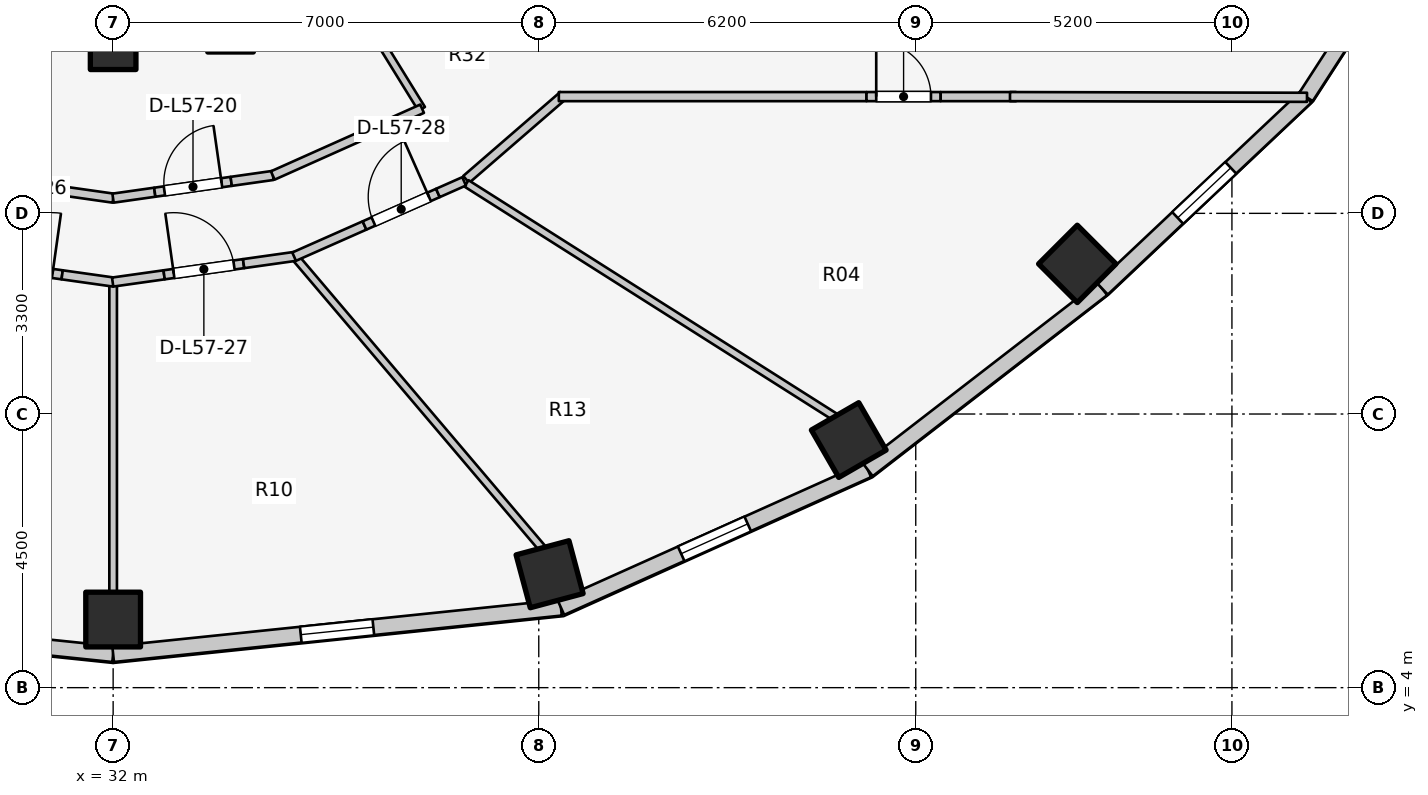
"""IFC4 building model, lengths in metres.
Left out: names, types, materials, properties, quantities, classifications, styles, units other than length and angle.
Written with IfcOpenShell. Run it as: python <this file> out.ifc"""

import sys

from ifc_helpers import new_model, si_unit, direction, frame, frame_2d, origin, origin_2d, place, context, subcontext, project, spatial, rectangle, extrude, element, fill, save


model = new_model("IFC4")
c1 = context("Model", 3, precision=1e-05, world=origin(), true_north=direction((0.0, 1.0)))
c2 = subcontext(c1, "Body", "Model", "MODEL_VIEW")
j1 = project(units=[si_unit("LENGTHUNIT", "METRE"), si_unit("PLANEANGLEUNIT", "RADIAN")], contexts=[c1])
p1 = place(None, origin())
s1 = spatial("IfcSite", under=j1, at=p1, CompositionType="ELEMENT")
p2 = place(p1, origin())
s2 = spatial("IfcBuilding", under=s1, at=p2, CompositionType="ELEMENT")
p3 = place(p2, frame((0.0, 0.0, 187.0)))
s3 = spatial("IfcBuildingStorey", under=s2, at=p3, CompositionType="ELEMENT", Elevation=187.0)
p4 = place(p3, frame((32.0, 14.54, 0.0), z_axis=(0.0, 0.0, 1.0), x_axis=(1.0, 0.0, 0.0)))
e1 = element("IfcColumn", 1, at=p4, inside=s3, PredefinedType="COLUMN", context=c2, shape_type="SweptSolid", body=[
    extrude(rectangle(XDim=0.75, YDim=0.75, at=origin_2d()), origin(), (0.0, 0.0, 1.0), 3.1),
])
for number, where, z_axis, x_axis in (
    (2, (32.0, 5.12, 0.0), (0.0, 0.0, 1.0), (0.0, -1.0, 0.0)),
    (3, (39.178, 5.865, 0.0), (0.0, 0.0, 1.0), (0.259, -0.966, 0.0)),
    (4, (44.098, 8.072, 0.0), (0.0, 0.0, 1.0), (0.5, -0.866, 0.0)),
    (5, (47.857, 10.969, 0.0), (0.0, 0.0, 1.0), (0.707, -0.707, 0.0)),
):
    element("IfcColumn", number, at=place(p3, frame(where, z_axis=z_axis, x_axis=x_axis)), inside=s3, PredefinedType="COLUMN", context=c2, shape_type="SweptSolid", body=[
        extrude(rectangle(XDim=0.9, YDim=0.9, at=origin_2d()), origin(), (0.0, 0.0, 1.0), 3.1),
    ])
p5 = place(p3, frame((24.635, 5.315, 0.0), z_axis=(0.0, 0.0, 1.0), x_axis=(0.994664178965, -0.10316574569, 0.0)))
e6 = element("IfcWall", 6, at=p5, inside=s3, PredefinedType="STANDARD", context=c2, shape_type="SweptSolid", body=[
    extrude(rectangle(XDim=7.405, YDim=0.26, at=frame_2d((3.702, 0.0))), origin(), (0.0, 0.0, 1.0), 1.22),
])
p6 = place(p5, frame((3.102, 0.0, 0.15)))
e7 = element("IfcOpeningElement", 7, at=p6, cuts=e6, PredefinedType="OPENING", context=c2, shape_type="SweptSolid", body=[
    extrude(rectangle(XDim=1.2, YDim=0.9, at=frame_2d((0.6, 0.45))), frame((0.0, 0.14, 0.0), z_axis=(0.0, -1.0, 0.0), x_axis=(1.0, 0.0, 0.0)), (0.0, 0.0, 1.0), 0.28),
])
p7 = place(p3, frame((32.0, 4.552, 0.0), z_axis=(0.0, 0.0, 1.0), x_axis=(0.994664178965, 0.10316574569, 0.0)))
e8 = element("IfcWall", 8, at=p7, inside=s3, PredefinedType="STANDARD", context=c2, shape_type="SweptSolid", body=[
    extrude(rectangle(XDim=7.405, YDim=0.26, at=frame_2d((3.702, 0.0))), origin(), (0.0, 0.0, 1.0), 1.22),
])
p8 = place(p7, frame((3.102, 0.0, 0.15)))
e9 = element("IfcOpeningElement", 9, at=p8, cuts=e8, PredefinedType="OPENING", context=c2, shape_type="SweptSolid", body=[
    extrude(rectangle(XDim=1.2, YDim=0.9, at=frame_2d((0.6, 0.45))), frame((0.0, 0.14, 0.0), z_axis=(0.0, -1.0, 0.0), x_axis=(1.0, 0.0, 0.0)), (0.0, 0.0, 1.0), 0.28),
])
p9 = place(p3, frame((39.365, 5.315, 0.0), z_axis=(0.0, 0.0, 1.0), x_axis=(0.912353637112, 0.409403029847, 0.0)))
e10 = element("IfcWall", 10, at=p9, inside=s3, PredefinedType="STANDARD", context=c2, shape_type="SweptSolid", body=[
    extrude(rectangle(XDim=5.533, YDim=0.26, at=frame_2d((2.766, 0.0))), origin(), (0.0, 0.0, 1.0), 1.22),
])
p10 = place(p9, frame((2.167, 0.0, 0.15)))
e11 = element("IfcOpeningElement", 11, at=p10, cuts=e10, PredefinedType="OPENING", context=c2, shape_type="SweptSolid", body=[
    extrude(rectangle(XDim=1.2, YDim=0.9, at=frame_2d((0.6, 0.45))), frame((0.0, 0.14, 0.0), z_axis=(0.0, -1.0, 0.0), x_axis=(1.0, 0.0, 0.0)), (0.0, 0.0, 1.0), 0.28),
])
p11 = place(p3, frame((44.413, 7.581, 0.0), z_axis=(0.0, 0.0, 1.0), x_axis=(0.791460185804, 0.611220724687, 0.0)))
e12 = element("IfcWall", 12, at=p11, inside=s3, PredefinedType="STANDARD", context=c2, shape_type="SweptSolid", body=[
    extrude(rectangle(XDim=4.872, YDim=0.26, at=frame_2d((2.436, 0.0))), origin(), (0.0, 0.0, 1.0), 1.22),
])
p12 = place(p3, frame((48.269, 10.559, 0.0), z_axis=(0.0, 0.0, 1.0), x_axis=(0.727667301037, 0.68593024354, 0.0)))
e13 = element("IfcWall", 13, at=p12, inside=s3, PredefinedType="STANDARD", context=c2, shape_type="SweptSolid", body=[
    extrude(rectangle(XDim=4.604, YDim=0.26, at=frame_2d((2.302, 0.0))), origin(), (0.0, 0.0, 1.0), 1.22),
])
p13 = place(p12, frame((1.702, 0.0, 0.15)))
e14 = element("IfcOpeningElement", 14, at=p13, cuts=e13, PredefinedType="OPENING", context=c2, shape_type="SweptSolid", body=[
    extrude(rectangle(XDim=1.2, YDim=0.9, at=frame_2d((0.6, 0.45))), frame((0.0, 0.14, 0.0), z_axis=(0.0, -1.0, 0.0), x_axis=(1.0, 0.0, 0.0)), (0.0, 0.0, 1.0), 0.28),
])
p14 = place(p3, frame((51.619, 13.716, 0.0), z_axis=(0.0, 0.0, 1.0), x_axis=(0.543358984534, 0.839500454989, 0.0)))
e15 = element("IfcWall", 15, at=p14, inside=s3, PredefinedType="STANDARD", context=c2, shape_type="SweptSolid", body=[
    extrude(rectangle(XDim=4.511, YDim=0.26, at=frame_2d((2.256, 0.0))), origin(), (0.0, 0.0, 1.0), 1.22),
])
p15 = place(p14, frame((1.656, 0.0, 0.15)))
e16 = element("IfcOpeningElement", 16, at=p15, cuts=e15, PredefinedType="OPENING", context=c2, shape_type="SweptSolid", body=[
    extrude(rectangle(XDim=1.2, YDim=0.9, at=frame_2d((0.6, 0.45))), frame((0.0, 0.14, 0.0), z_axis=(0.0, -1.0, 0.0), x_axis=(1.0, 0.0, 0.0)), (0.0, 0.0, 1.0), 0.28),
])
p16 = place(p3, frame((37.807, 12.358, 0.0), z_axis=(0.0, 0.0, 1.0), x_axis=(0.756055312247, 0.654507727092, 0.0)))
e17 = element("IfcWall", 17, at=p16, inside=s3, PredefinedType="PARTITIONING", context=c2, shape_type="SweptSolid", body=[
    extrude(rectangle(XDim=2.111, YDim=0.15, at=frame_2d((1.055, 0.0))), origin(), (0.0, 0.0, 1.0), 1.22),
])
p17 = place(p3, frame((39.33, 13.72, 0.0), z_axis=(0.0, 0.0, 1.0), x_axis=(1.0, 0.0, 0.0)))
e18 = element("IfcWall", 18, at=p17, inside=s3, PredefinedType="PARTITIONING", context=c2, shape_type="SweptSolid", body=[
    extrude(rectangle(XDim=5.06, YDim=0.15, at=frame_2d((2.53, 0.0))), origin(), (0.0, 0.0, 1.0), 1.22),
])
p18 = place(p3, frame((44.39, 13.72, 0.0), z_axis=(0.0, 0.0, 1.0), x_axis=(1.0, 0.0, 0.0)))
e19 = element("IfcWall", 19, at=p18, inside=s3, PredefinedType="PARTITIONING", context=c2, shape_type="SweptSolid", body=[
    extrude(rectangle(XDim=1.22, YDim=0.15, at=frame_2d((0.61, 0.0))), origin(), (0.0, 0.0, 1.0), 2.575),
])
p19 = place(p18, frame((0.16, 0.0, 0.0)))
e20 = element("IfcOpeningElement", 20, at=p19, cuts=e19, PredefinedType="OPENING", context=c2, shape_type="SweptSolid", body=[
    extrude(rectangle(XDim=0.9, YDim=2.1, at=frame_2d((0.45, 1.05))), frame((0.0, 0.085, 0.0), z_axis=(0.0, -1.0, 0.0), x_axis=(1.0, 0.0, 0.0)), (0.0, 0.0, 1.0), 0.17),
])
p20 = place(p3, frame((45.61, 13.72, 0.0), z_axis=(0.0, 0.0, 1.0), x_axis=(1.0, 0.0, 0.0)))
e21 = element("IfcWall", 21, at=p20, inside=s3, PredefinedType="PARTITIONING", context=c2, shape_type="SweptSolid", body=[
    extrude(rectangle(XDim=1.24, YDim=0.15, at=frame_2d((0.62, 0.0))), origin(), (0.0, 0.0, 1.0), 2.575),
])
p21 = place(p3, frame((46.75, 13.72, 0.0), z_axis=(0.0, 0.0, 1.0), x_axis=(0.999997122315, -0.00239903348, 0.0)))
e22 = element("IfcWall", 22, at=p21, inside=s3, PredefinedType="PARTITIONING", context=c2, shape_type="SweptSolid", body=[
    extrude(rectangle(XDim=4.885, YDim=0.15, at=frame_2d((2.442, 0.0))), origin(), (0.0, 0.0, 1.0), 1.22),
])
p22 = place(p3, frame((35.55, 15.985, 0.0), z_axis=(0.0, 0.0, 1.0), x_axis=(0.525627246902, -0.850714991824, 0.0)))
e23 = element("IfcWall", 23, at=p22, inside=s3, PredefinedType="PARTITIONING", context=c2, shape_type="SweptSolid", body=[
    extrude(rectangle(XDim=2.901, YDim=0.125, at=frame_2d((1.451, 0.0))), origin(), (0.0, 0.0, 1.0), 1.22),
])
p23 = place(p3, frame((29.371, 12.424, 0.0), z_axis=(0.0, 0.0, 1.0), x_axis=(0.990066775667, -0.1405979364, 0.0)))
e24 = element("IfcWall", 24, at=p23, inside=s3, PredefinedType="PARTITIONING", context=c2, shape_type="SweptSolid", body=[
    extrude(rectangle(XDim=2.657, YDim=0.15, at=frame_2d((1.328, 0.0))), origin(), (0.0, 0.0, 1.0), 1.22),
])
p24 = place(p3, frame((31.998, 12.05, 0.0), z_axis=(0.0, 0.0, 1.0), x_axis=(0.990082845611, 0.140484728093, 0.0)))
e25 = element("IfcWall", 25, at=p24, inside=s3, PredefinedType="PARTITIONING", context=c2, shape_type="SweptSolid", body=[
    extrude(rectangle(XDim=0.693, YDim=0.15, at=frame_2d((0.347, 0.0))), origin(), (0.0, 0.0, 1.0), 1.22),
])
p25 = place(p3, frame((32.685, 12.147, 0.0), z_axis=(0.0, 0.0, 1.0), x_axis=(0.990049212475, 0.140721557967, 0.0)))
e26 = element("IfcWall", 26, at=p25, inside=s3, PredefinedType="PARTITIONING", context=c2, shape_type="SweptSolid", body=[
    extrude(rectangle(XDim=1.27, YDim=0.15, at=frame_2d((0.635, 0.0))), origin(), (0.0, 0.0, 1.0), 2.575),
])
p26 = place(p25, frame((0.16, 0.0, 0.0)))
e27 = element("IfcOpeningElement", 27, at=p26, cuts=e26, PredefinedType="OPENING", context=c2, shape_type="SweptSolid", body=[
    extrude(rectangle(XDim=0.95, YDim=2.1, at=frame_2d((0.475, 1.05))), frame((0.0, 0.085, 0.0), z_axis=(0.0, -1.0, 0.0), x_axis=(1.0, 0.0, 0.0)), (0.0, 0.0, 1.0), 0.17),
])
p27 = place(p3, frame((33.942, 12.326, 0.0), z_axis=(0.0, 0.0, 1.0), x_axis=(0.990082845611, 0.140484728093, 0.0)))
e28 = element("IfcWall", 28, at=p27, inside=s3, PredefinedType="PARTITIONING", context=c2, shape_type="SweptSolid", body=[
    extrude(rectangle(XDim=0.693, YDim=0.15, at=frame_2d((0.347, 0.0))), origin(), (0.0, 0.0, 1.0), 2.575),
])
p28 = place(p3, frame((34.625, 12.423, 0.0), z_axis=(0.0, 0.0, 1.0), x_axis=(0.912888568324, 0.408208845842, 0.0)))
e29 = element("IfcWall", 29, at=p28, inside=s3, PredefinedType="PARTITIONING", context=c2, shape_type="SweptSolid", body=[
    extrude(rectangle(XDim=2.69, YDim=0.15, at=frame_2d((1.345, 0.0))), origin(), (0.0, 0.0, 1.0), 1.22),
])
p29 = place(p3, frame((32.0, 10.615, 0.0), z_axis=(0.0, 0.0, 1.0), x_axis=(0.0, -1.0, 0.0)))
e30 = element("IfcWall", 30, at=p29, inside=s3, PredefinedType="PARTITIONING", context=c2, shape_type="SweptSolid", body=[
    extrude(rectangle(XDim=5.065, YDim=0.125, at=frame_2d((2.532, 0.0))), origin(), (0.0, 0.0, 1.0), 1.22),
])
p30 = place(p3, frame((35.02, 11.048, 0.0), z_axis=(0.0, 0.0, 1.0), x_axis=(0.647173462792, -0.762342776615, 0.0)))
e31 = element("IfcWall", 31, at=p30, inside=s3, PredefinedType="PARTITIONING", context=c2, shape_type="SweptSolid", body=[
    extrude(rectangle(XDim=6.253, YDim=0.125, at=frame_2d((3.127, 0.0))), origin(), (0.0, 0.0, 1.0), 1.22),
])
p31 = place(p3, frame((37.812, 12.292, 0.0), z_axis=(0.0, 0.0, 1.0), x_axis=(0.844640430122, -0.535334048799, 0.0)))
e32 = element("IfcWall", 32, at=p31, inside=s3, PredefinedType="PARTITIONING", context=c2, shape_type="SweptSolid", body=[
    extrude(rectangle(XDim=7.188, YDim=0.125, at=frame_2d((3.594, 0.0))), origin(), (0.0, 0.0, 1.0), 1.22),
])
p32 = place(p3, frame((29.854, 10.973, 0.0), z_axis=(0.0, 0.0, 1.0), x_axis=(0.990254187593, -0.139271834751, 0.0)))
e33 = element("IfcWall", 33, at=p32, inside=s3, PredefinedType="PARTITIONING", context=c2, shape_type="SweptSolid", body=[
    extrude(rectangle(XDim=1.32, YDim=0.15, at=frame_2d((0.66, 0.0))), origin(), (0.0, 0.0, 1.0), 2.575),
])
p33 = place(p32, frame((0.16, 0.0, 0.0)))
e34 = element("IfcOpeningElement", 34, at=p33, cuts=e33, PredefinedType="OPENING", context=c2, shape_type="SweptSolid", body=[
    extrude(rectangle(XDim=1.0, YDim=2.1, at=frame_2d((0.5, 1.05))), frame((0.0, 0.085, 0.0), z_axis=(0.0, -1.0, 0.0), x_axis=(1.0, 0.0, 0.0)), (0.0, 0.0, 1.0), 0.17),
])
for number, where, z_axis, x_axis in (
    (35, (31.162, 10.789, 0.0), (0.0, 0.0, 1.0), (0.99, -0.14, 0.0)),
    (36, (31.992, 10.67, 0.0), (0.0, 0.0, 1.0), (0.99, 0.14, 0.0)),
):
    element("IfcWall", number, at=place(p3, frame(where, z_axis=z_axis, x_axis=x_axis)), inside=s3, PredefinedType="PARTITIONING", context=c2, shape_type="SweptSolid", body=[
        extrude(rectangle(XDim=0.855, YDim=0.15, at=frame_2d((0.427, 0.0))), origin(), (0.0, 0.0, 1.0), 1.22),
    ])
p34 = place(p3, frame((32.838, 10.789, 0.0), z_axis=(0.0, 0.0, 1.0), x_axis=(0.990254187593, 0.139271834751, 0.0)))
e37 = element("IfcWall", 37, at=p34, inside=s3, PredefinedType="PARTITIONING", context=c2, shape_type="SweptSolid", body=[
    extrude(rectangle(XDim=1.32, YDim=0.15, at=frame_2d((0.66, 0.0))), origin(), (0.0, 0.0, 1.0), 2.575),
])
p35 = place(p34, frame((0.16, 0.0, 0.0)))
e38 = element("IfcOpeningElement", 38, at=p35, cuts=e37, PredefinedType="OPENING", context=c2, shape_type="SweptSolid", body=[
    extrude(rectangle(XDim=1.0, YDim=2.1, at=frame_2d((0.5, 1.05))), frame((0.0, 0.085, 0.0), z_axis=(0.0, -1.0, 0.0), x_axis=(1.0, 0.0, 0.0)), (0.0, 0.0, 1.0), 0.17),
])
p36 = place(p3, frame((34.146, 10.973, 0.0), z_axis=(0.0, 0.0, 1.0), x_axis=(0.990238723834, 0.139381741342, 0.0)))
e39 = element("IfcWall", 39, at=p36, inside=s3, PredefinedType="PARTITIONING", context=c2, shape_type="SweptSolid", body=[
    extrude(rectangle(XDim=0.855, YDim=0.15, at=frame_2d((0.427, 0.0))), origin(), (0.0, 0.0, 1.0), 2.575),
])
p37 = place(p3, frame((34.976, 11.088, 0.0), z_axis=(0.0, 0.0, 1.0), x_axis=(0.914311660367, 0.405011342701, 0.0)))
e40 = element("IfcWall", 40, at=p37, inside=s3, PredefinedType="PARTITIONING", context=c2, shape_type="SweptSolid", body=[
    extrude(rectangle(XDim=1.267, YDim=0.15, at=frame_2d((0.633, 0.0))), origin(), (0.0, 0.0, 1.0), 1.22),
])
p38 = place(p3, frame((36.134, 11.601, 0.0), z_axis=(0.0, 0.0, 1.0), x_axis=(0.914314172667, 0.405005671145, 0.0)))
e41 = element("IfcWall", 41, at=p38, inside=s3, PredefinedType="PARTITIONING", context=c2, shape_type="SweptSolid", body=[
    extrude(rectangle(XDim=1.32, YDim=0.15, at=frame_2d((0.66, 0.0))), origin(), (0.0, 0.0, 1.0), 2.16),
])
p39 = place(p38, frame((0.16, 0.0, 0.0)))
e42 = element("IfcOpeningElement", 42, at=p39, cuts=e41, PredefinedType="OPENING", context=c2, shape_type="SweptSolid", body=[
    extrude(rectangle(XDim=1.0, YDim=2.1, at=frame_2d((0.5, 1.05))), frame((0.0, 0.085, 0.0), z_axis=(0.0, -1.0, 0.0), x_axis=(1.0, 0.0, 0.0)), (0.0, 0.0, 1.0), 0.17),
])
p40 = place(p3, frame((37.341, 12.135, 0.0), z_axis=(0.0, 0.0, 1.0), x_axis=(0.914387769504, 0.404839482983, 0.0)))
e43 = element("IfcWall", 43, at=p40, inside=s3, PredefinedType="PARTITIONING", context=c2, shape_type="SweptSolid", body=[
    extrude(rectangle(XDim=0.471, YDim=0.15, at=frame_2d((0.235, 0.0))), origin(), (0.0, 0.0, 1.0), 2.575),
])
p41 = place(p8, origin())
e44 = element("IfcWindow", 44, at=p41, inside=s3, PartitioningType="SINGLE_PANEL", PredefinedType="WINDOW", context=c2, shape_type="SweptSolid", body=[
    extrude(rectangle(XDim=1.2, YDim=0.9, at=frame_2d((0.6, 0.45))), frame((0.0, 0.03, 0.0), z_axis=(0.0, -1.0, 0.0), x_axis=(1.0, 0.0, 0.0)), (0.0, 0.0, 1.0), 0.06),
])
fill(e9, e44)
p42 = place(p10, origin())
e45 = element("IfcWindow", 45, at=p42, inside=s3, PartitioningType="SINGLE_PANEL", PredefinedType="WINDOW", context=c2, shape_type="SweptSolid", body=[
    extrude(rectangle(XDim=1.2, YDim=0.9, at=frame_2d((0.6, 0.45))), frame((0.0, 0.03, 0.0), z_axis=(0.0, -1.0, 0.0), x_axis=(1.0, 0.0, 0.0)), (0.0, 0.0, 1.0), 0.06),
])
fill(e11, e45)
p43 = place(p13, origin())
e46 = element("IfcWindow", 46, at=p43, inside=s3, PartitioningType="SINGLE_PANEL", PredefinedType="WINDOW", context=c2, shape_type="SweptSolid", body=[
    extrude(rectangle(XDim=1.2, YDim=0.9, at=frame_2d((0.6, 0.45))), frame((0.0, 0.03, 0.0), z_axis=(0.0, -1.0, 0.0), x_axis=(1.0, 0.0, 0.0)), (0.0, 0.0, 1.0), 0.06),
])
fill(e14, e46)
p44 = place(p19, origin())
e47 = element("IfcDoor", 47, at=p44, inside=s3, OperationType="SINGLE_SWING_LEFT", PredefinedType="DOOR", context=c2, shape_type="SweptSolid", body=[
    extrude(rectangle(XDim=0.9, YDim=2.1, at=frame_2d((0.45, 1.05))), frame((0.0, 0.025, 0.0), z_axis=(0.0, -1.0, 0.0), x_axis=(1.0, 0.0, 0.0)), (0.0, 0.0, 1.0), 0.05),
])
fill(e20, e47)
p45 = place(p26, origin())
e48 = element("IfcDoor", 48, at=p45, inside=s3, OperationType="SINGLE_SWING_RIGHT", PredefinedType="DOOR", context=c2, shape_type="SweptSolid", body=[
    extrude(rectangle(XDim=0.95, YDim=2.1, at=frame_2d((0.475, 1.05))), frame((0.0, 0.025, 0.0), z_axis=(0.0, -1.0, 0.0), x_axis=(1.0, 0.0, 0.0)), (0.0, 0.0, 1.0), 0.05),
])
fill(e27, e48)
p46 = place(p33, origin())
e49 = element("IfcDoor", 49, at=p46, inside=s3, OperationType="SINGLE_SWING_RIGHT", PredefinedType="DOOR", context=c2, shape_type="SweptSolid", body=[
    extrude(rectangle(XDim=1.0, YDim=2.1, at=frame_2d((0.5, 1.05))), frame((0.0, 0.025, 0.0), z_axis=(0.0, -1.0, 0.0), x_axis=(1.0, 0.0, 0.0)), (0.0, 0.0, 1.0), 0.05),
])
fill(e34, e49)
p47 = place(p35, origin())
e50 = element("IfcDoor", 50, at=p47, inside=s3, OperationType="SINGLE_SWING_LEFT", PredefinedType="DOOR", context=c2, shape_type="SweptSolid", body=[
    extrude(rectangle(XDim=1.0, YDim=2.1, at=frame_2d((0.5, 1.05))), frame((0.0, 0.025, 0.0), z_axis=(0.0, -1.0, 0.0), x_axis=(1.0, 0.0, 0.0)), (0.0, 0.0, 1.0), 0.05),
])
fill(e38, e50)
p48 = place(p39, origin())
e51 = element("IfcDoor", 51, at=p48, inside=s3, OperationType="SINGLE_SWING_RIGHT", PredefinedType="DOOR", context=c2, shape_type="SweptSolid", body=[
    extrude(rectangle(XDim=1.0, YDim=2.1, at=frame_2d((0.5, 1.05))), frame((0.0, 0.025, 0.0), z_axis=(0.0, -1.0, 0.0), x_axis=(1.0, 0.0, 0.0)), (0.0, 0.0, 1.0), 0.05),
])
fill(e42, e51)
save(model, sys.argv[1])
